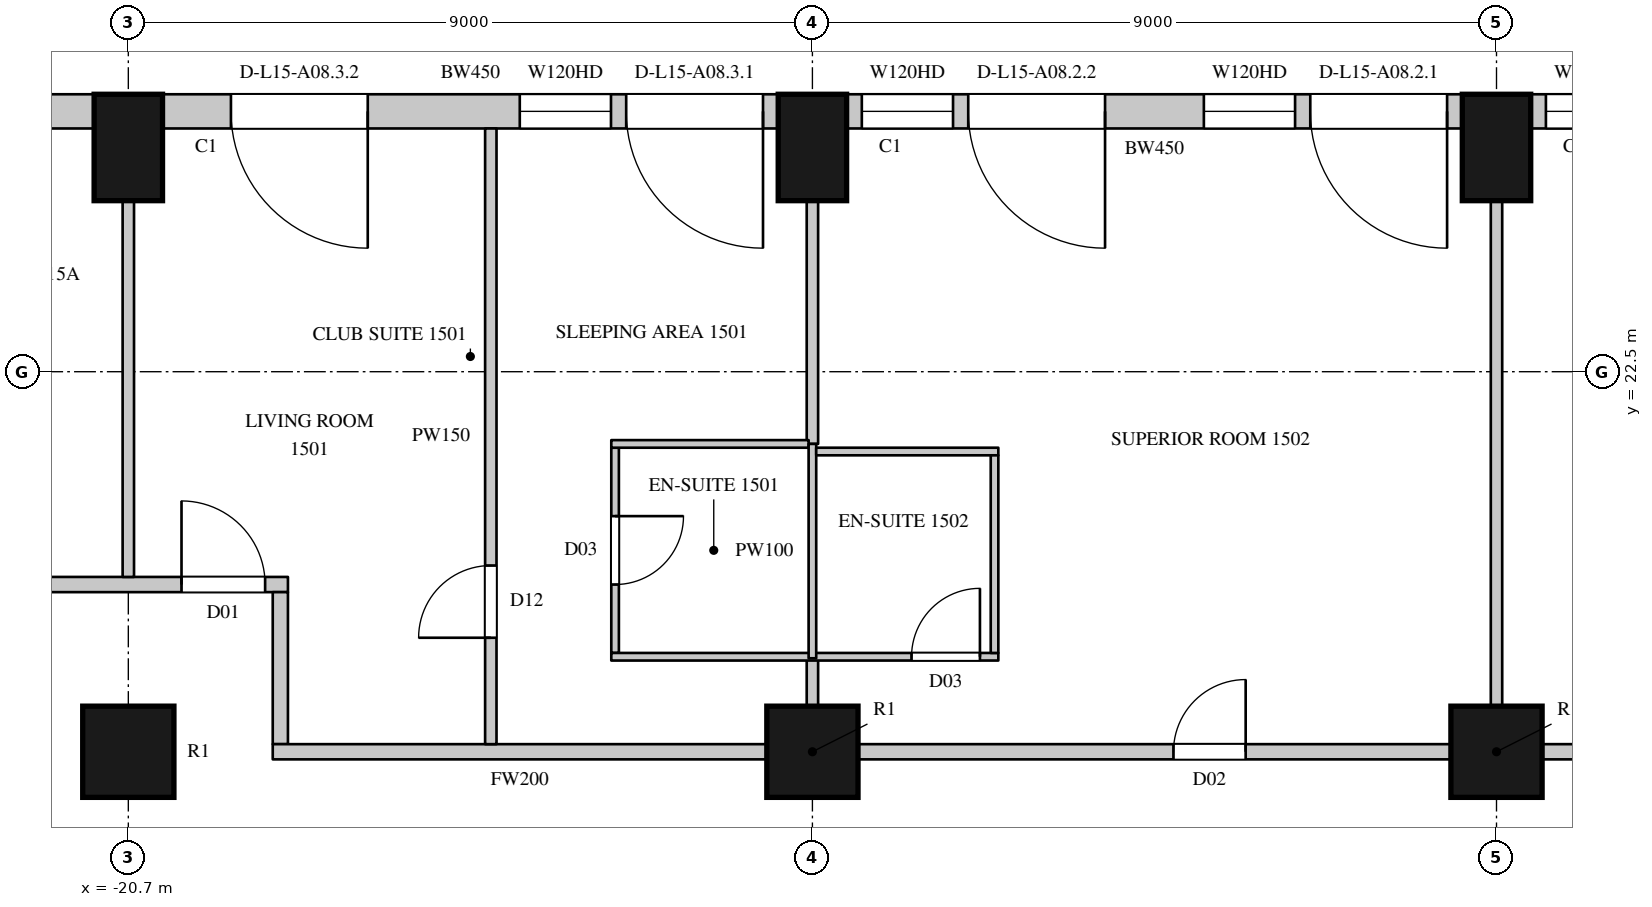
"""IFC4 building model, lengths in metres.
Left out: names, types, materials, properties, quantities, classifications, styles, units other than length and angle.
Written with IfcOpenShell. Run it as: python <this file> out.ifc"""

import sys

from ifc_helpers import new_model, si_unit, direction, frame, frame_2d, origin, origin_2d, place, context, subcontext, project, spatial, rectangle, circle, extrude, element, fill, save


model = new_model("IFC4")
c1 = context("Model", 3, precision=1e-05, world=origin(), true_north=direction((0.0, 1.0)))
c2 = subcontext(c1, "Body", "Model", "MODEL_VIEW")
j1 = project(units=[si_unit("LENGTHUNIT", "METRE"), si_unit("PLANEANGLEUNIT", "RADIAN")], contexts=[c1])
p1 = place(None, origin())
s1 = spatial("IfcSite", under=j1, at=p1, CompositionType="ELEMENT")
p2 = place(p1, origin())
s2 = spatial("IfcBuilding", under=s1, at=p2, CompositionType="ELEMENT")
p3 = place(p2, frame((0.0, 0.0, 84.3)))
s3 = spatial("IfcBuildingStorey", under=s2, at=p3, CompositionType="ELEMENT", Elevation=84.3)
for number, where, z_axis, x_axis in (
    (1, (-2.7, 25.45, 0.0), (0.0, 0.0, 1.0), (-1.0, 0.0, 0.0)),
    (2, (-11.7, 25.45, 0.0), (0.0, 0.0, 1.0), (-1.0, 0.0, 0.0)),
    (3, (-20.7, 25.45, 0.0), (0.0, 0.0, 1.0), (-1.0, 0.0, 0.0)),
):
    element("IfcColumn", number, at=place(p3, frame(where, z_axis=z_axis, x_axis=x_axis)), inside=s3, PredefinedType="COLUMN", context=c2, shape_type="SweptSolid", body=[
        extrude(rectangle(XDim=0.9, YDim=1.4, at=origin_2d()), origin(), (0.0, 0.0, 1.0), 3.6),
    ])
for number, where, z_axis, x_axis in (
    (4, (-20.7, 17.5, 0.0), (0.0, 0.0, 1.0), (1.0, 0.0, 0.0)),
    (5, (-11.7, 17.5, 0.0), (0.0, 0.0, 1.0), (1.0, 0.0, 0.0)),
    (6, (-2.7, 17.5, 0.0), (0.0, 0.0, 1.0), (1.0, 0.0, 0.0)),
):
    element("IfcColumn", number, at=place(p3, frame(where, z_axis=z_axis, x_axis=x_axis)), inside=s3, PredefinedType="COLUMN", context=c2, shape_type="SweptSolid", body=[
        extrude(circle(Radius=0.6, at=origin_2d()), origin(), (0.0, 0.0, 1.0), 3.6),
    ])
p4 = place(p3, frame((5.85, 25.925, 0.0), z_axis=(0.0, 0.0, 1.0), x_axis=(-1.0, 0.0, 0.0)))
e7 = element("IfcWall", 7, at=p4, inside=s3, PredefinedType="SOLIDWALL", context=c2, shape_type="SweptSolid", body=[
    extrude(rectangle(XDim=8.1, YDim=0.45, at=frame_2d((4.05, 0.0))), origin(), (0.0, 0.0, 1.0), 3.3),
])
p5 = place(p4, frame((0.2, 0.0, 0.0)))
e8 = element("IfcOpeningElement", 8, at=p5, cuts=e7, PredefinedType="OPENING", context=c2, shape_type="SweptSolid", body=[
    extrude(rectangle(XDim=1.8, YDim=2.4, at=frame_2d((0.9, 1.2))), frame((0.0, 0.235, 0.0), z_axis=(0.0, -1.0, 0.0), x_axis=(1.0, 0.0, 0.0)), (0.0, 0.0, 1.0), 0.47),
])
p6 = place(p4, frame((2.2, 0.0, 1.05)))
e9 = element("IfcOpeningElement", 9, at=p6, cuts=e7, PredefinedType="OPENING", context=c2, shape_type="SweptSolid", body=[
    extrude(rectangle(XDim=1.2, YDim=2.0, at=frame_2d((0.6, 1.0))), frame((0.0, 0.235, 0.0), z_axis=(0.0, -1.0, 0.0), x_axis=(1.0, 0.0, 0.0)), (0.0, 0.0, 1.0), 0.47),
])
p7 = place(p4, frame((4.7, 0.0, 0.0)))
e10 = element("IfcOpeningElement", 10, at=p7, cuts=e7, PredefinedType="OPENING", context=c2, shape_type="SweptSolid", body=[
    extrude(rectangle(XDim=1.8, YDim=2.4, at=frame_2d((0.9, 1.2))), frame((0.0, 0.235, 0.0), z_axis=(0.0, -1.0, 0.0), x_axis=(1.0, 0.0, 0.0)), (0.0, 0.0, 1.0), 0.47),
])
p8 = place(p4, frame((6.7, 0.0, 1.05)))
e11 = element("IfcOpeningElement", 11, at=p8, cuts=e7, PredefinedType="OPENING", context=c2, shape_type="SweptSolid", body=[
    extrude(rectangle(XDim=1.2, YDim=2.0, at=frame_2d((0.6, 1.0))), frame((0.0, 0.235, 0.0), z_axis=(0.0, -1.0, 0.0), x_axis=(1.0, 0.0, 0.0)), (0.0, 0.0, 1.0), 0.47),
])
p9 = place(p3, frame((-3.15, 25.925, 0.0), z_axis=(0.0, 0.0, 1.0), x_axis=(-1.0, 0.0, 0.0)))
e12 = element("IfcWall", 12, at=p9, inside=s3, PredefinedType="SOLIDWALL", context=c2, shape_type="SweptSolid", body=[
    extrude(rectangle(XDim=8.1, YDim=0.45, at=frame_2d((4.05, 0.0))), origin(), (0.0, 0.0, 1.0), 3.3),
])
p10 = place(p9, frame((0.2, 0.0, 0.0)))
e13 = element("IfcOpeningElement", 13, at=p10, cuts=e12, PredefinedType="OPENING", context=c2, shape_type="SweptSolid", body=[
    extrude(rectangle(XDim=1.8, YDim=2.4, at=frame_2d((0.9, 1.2))), frame((0.0, 0.235, 0.0), z_axis=(0.0, -1.0, 0.0), x_axis=(1.0, 0.0, 0.0)), (0.0, 0.0, 1.0), 0.47),
])
p11 = place(p9, frame((2.2, 0.0, 1.05)))
e14 = element("IfcOpeningElement", 14, at=p11, cuts=e12, PredefinedType="OPENING", context=c2, shape_type="SweptSolid", body=[
    extrude(rectangle(XDim=1.2, YDim=2.0, at=frame_2d((0.6, 1.0))), frame((0.0, 0.235, 0.0), z_axis=(0.0, -1.0, 0.0), x_axis=(1.0, 0.0, 0.0)), (0.0, 0.0, 1.0), 0.47),
])
p12 = place(p9, frame((4.7, 0.0, 0.0)))
e15 = element("IfcOpeningElement", 15, at=p12, cuts=e12, PredefinedType="OPENING", context=c2, shape_type="SweptSolid", body=[
    extrude(rectangle(XDim=1.8, YDim=2.4, at=frame_2d((0.9, 1.2))), frame((0.0, 0.235, 0.0), z_axis=(0.0, -1.0, 0.0), x_axis=(1.0, 0.0, 0.0)), (0.0, 0.0, 1.0), 0.47),
])
p13 = place(p9, frame((6.7, 0.0, 1.05)))
e16 = element("IfcOpeningElement", 16, at=p13, cuts=e12, PredefinedType="OPENING", context=c2, shape_type="SweptSolid", body=[
    extrude(rectangle(XDim=1.2, YDim=2.0, at=frame_2d((0.6, 1.0))), frame((0.0, 0.235, 0.0), z_axis=(0.0, -1.0, 0.0), x_axis=(1.0, 0.0, 0.0)), (0.0, 0.0, 1.0), 0.47),
])
p14 = place(p3, frame((-12.15, 25.925, 0.0), z_axis=(0.0, 0.0, 1.0), x_axis=(-1.0, 0.0, 0.0)))
e17 = element("IfcWall", 17, at=p14, inside=s3, PredefinedType="SOLIDWALL", context=c2, shape_type="SweptSolid", body=[
    extrude(rectangle(XDim=8.1, YDim=0.45, at=frame_2d((4.05, 0.0))), origin(), (0.0, 0.0, 1.0), 3.3),
])
p15 = place(p14, frame((0.2, 0.0, 0.0)))
e18 = element("IfcOpeningElement", 18, at=p15, cuts=e17, PredefinedType="OPENING", context=c2, shape_type="SweptSolid", body=[
    extrude(rectangle(XDim=1.8, YDim=2.4, at=frame_2d((0.9, 1.2))), frame((0.0, 0.235, 0.0), z_axis=(0.0, -1.0, 0.0), x_axis=(1.0, 0.0, 0.0)), (0.0, 0.0, 1.0), 0.47),
])
p16 = place(p14, frame((2.2, 0.0, 1.05)))
e19 = element("IfcOpeningElement", 19, at=p16, cuts=e17, PredefinedType="OPENING", context=c2, shape_type="SweptSolid", body=[
    extrude(rectangle(XDim=1.2, YDim=2.0, at=frame_2d((0.6, 1.0))), frame((0.0, 0.235, 0.0), z_axis=(0.0, -1.0, 0.0), x_axis=(1.0, 0.0, 0.0)), (0.0, 0.0, 1.0), 0.47),
])
p17 = place(p14, frame((5.4, 0.0, 0.0)))
e20 = element("IfcOpeningElement", 20, at=p17, cuts=e17, PredefinedType="OPENING", context=c2, shape_type="SweptSolid", body=[
    extrude(rectangle(XDim=1.8, YDim=2.4, at=frame_2d((0.9, 1.2))), frame((0.0, 0.235, 0.0), z_axis=(0.0, -1.0, 0.0), x_axis=(1.0, 0.0, 0.0)), (0.0, 0.0, 1.0), 0.47),
])
p18 = place(p3, frame((-21.15, 25.925, 0.0), z_axis=(0.0, 0.0, 1.0), x_axis=(-1.0, 0.0, 0.0)))
e21 = element("IfcWall", 21, at=p18, inside=s3, PredefinedType="SOLIDWALL", context=c2, shape_type="SweptSolid", body=[
    extrude(rectangle(XDim=2.914, YDim=0.45, at=frame_2d((1.457, 0.0))), origin(), (0.0, 0.0, 1.0), 3.3),
])
p19 = place(p3, frame((-23.7, 19.7, 0.0), z_axis=(0.0, 0.0, 1.0), x_axis=(1.0, 0.0, 0.0)))
e22 = element("IfcWall", 22, at=p19, inside=s3, PredefinedType="PARTITIONING", context=c2, shape_type="SweptSolid", body=[
    extrude(rectangle(XDim=5.1, YDim=0.2, at=frame_2d((2.55, 0.0))), origin(), (0.0, 0.0, 1.0), 3.3),
])
p20 = place(p19, frame((0.8, 0.0, 0.0)))
e23 = element("IfcOpeningElement", 23, at=p20, cuts=e22, PredefinedType="OPENING", context=c2, shape_type="SweptSolid", body=[
    extrude(rectangle(XDim=0.9, YDim=2.2, at=frame_2d((0.45, 1.1))), frame((0.0, 0.11, 0.0), z_axis=(0.0, -1.0, 0.0), x_axis=(1.0, 0.0, 0.0)), (0.0, 0.0, 1.0), 0.22),
])
p21 = place(p19, frame((3.7, 0.0, 0.0)))
e24 = element("IfcOpeningElement", 24, at=p21, cuts=e22, PredefinedType="OPENING", context=c2, shape_type="SweptSolid", body=[
    extrude(rectangle(XDim=1.1, YDim=2.4, at=frame_2d((0.55, 1.2))), frame((0.0, 0.11, 0.0), z_axis=(0.0, -1.0, 0.0), x_axis=(1.0, 0.0, 0.0)), (0.0, 0.0, 1.0), 0.22),
])
p22 = place(p3, frame((-18.7, 17.6, 0.0), z_axis=(0.0, 0.0, 1.0), x_axis=(0.0, 1.0, 0.0)))
e25 = element("IfcWall", 25, at=p22, inside=s3, PredefinedType="PARTITIONING", context=c2, shape_type="SweptSolid", body=[
    extrude(rectangle(XDim=2.0, YDim=0.2, at=frame_2d((1.0, 0.0))), origin(), (0.0, 0.0, 1.0), 3.3),
])
p23 = place(p3, frame((-18.8, 17.5, 0.0), z_axis=(0.0, 0.0, 1.0), x_axis=(1.0, 0.0, 0.0)))
e26 = element("IfcWall", 26, at=p23, inside=s3, PredefinedType="PARTITIONING", context=c2, shape_type="SweptSolid", body=[
    extrude(rectangle(XDim=6.5, YDim=0.2, at=frame_2d((3.25, 0.0))), origin(), (0.0, 0.0, 1.0), 2.75),
])
p24 = place(p3, frame((-11.1, 17.5, 0.0), z_axis=(0.0, 0.0, 1.0), x_axis=(1.0, 0.0, 0.0)))
e27 = element("IfcWall", 27, at=p24, inside=s3, PredefinedType="PARTITIONING", context=c2, shape_type="SweptSolid", body=[
    extrude(rectangle(XDim=7.8, YDim=0.2, at=frame_2d((3.9, 0.0))), origin(), (0.0, 0.0, 1.0), 2.75),
])
p25 = place(p24, frame((4.15, 0.0, 0.0)))
e28 = element("IfcOpeningElement", 28, at=p25, cuts=e27, PredefinedType="OPENING", context=c2, shape_type="SweptSolid", body=[
    extrude(rectangle(XDim=0.95, YDim=2.2, at=frame_2d((0.475, 1.1))), frame((0.0, 0.11, 0.0), z_axis=(0.0, -1.0, 0.0), x_axis=(1.0, 0.0, 0.0)), (0.0, 0.0, 1.0), 0.22),
])
p26 = place(p3, frame((-2.1, 17.5, 0.0), z_axis=(0.0, 0.0, 1.0), x_axis=(1.0, 0.0, 0.0)))
e29 = element("IfcWall", 29, at=p26, inside=s3, PredefinedType="PARTITIONING", context=c2, shape_type="SweptSolid", body=[
    extrude(rectangle(XDim=7.8, YDim=0.2, at=frame_2d((3.9, 0.0))), origin(), (0.0, 0.0, 1.0), 2.75),
])
p27 = place(p26, frame((1.55, 0.0, 0.0)))
e30 = element("IfcOpeningElement", 30, at=p27, cuts=e29, PredefinedType="OPENING", context=c2, shape_type="SweptSolid", body=[
    extrude(rectangle(XDim=1.1, YDim=2.4, at=frame_2d((0.55, 1.2))), frame((0.0, 0.11, 0.0), z_axis=(0.0, -1.0, 0.0), x_axis=(1.0, 0.0, 0.0)), (0.0, 0.0, 1.0), 0.22),
])
p28 = place(p3, frame((-20.7, 19.8, 0.0), z_axis=(0.0, 0.0, 1.0), x_axis=(0.0, 1.0, 0.0)))
e31 = element("IfcWall", 31, at=p28, inside=s3, PredefinedType="PARTITIONING", context=c2, shape_type="SweptSolid", body=[
    extrude(rectangle(XDim=4.95, YDim=0.15, at=frame_2d((2.475, 0.0))), origin(), (0.0, 0.0, 1.0), 2.75),
])
p29 = place(p3, frame((-15.931, 17.6, 0.0), z_axis=(0.0, 0.0, 1.0), x_axis=(0.0, 1.0, 0.0)))
e32 = element("IfcWall", 32, at=p29, inside=s3, PredefinedType="PARTITIONING", context=c2, shape_type="SweptSolid", body=[
    extrude(rectangle(XDim=8.1, YDim=0.15, at=frame_2d((4.05, 0.0))), origin(), (0.0, 0.0, 1.0), 3.3),
])
p30 = place(p29, frame((1.4, 0.0, 0.0)))
e33 = element("IfcOpeningElement", 33, at=p30, cuts=e32, PredefinedType="OPENING", context=c2, shape_type="SweptSolid", body=[
    extrude(rectangle(XDim=0.95, YDim=2.2, at=frame_2d((0.475, 1.1))), frame((0.0, 0.085, 0.0), z_axis=(0.0, -1.0, 0.0), x_axis=(1.0, 0.0, 0.0)), (0.0, 0.0, 1.0), 0.17),
])
p31 = place(p3, frame((-11.7, 18.1, 0.0), z_axis=(0.0, 0.0, 1.0), x_axis=(0.0, 1.0, 0.0)))
e34 = element("IfcWall", 34, at=p31, inside=s3, PredefinedType="PARTITIONING", context=c2, shape_type="SweptSolid", body=[
    extrude(rectangle(XDim=0.63, YDim=0.15, at=frame_2d((0.315, 0.0))), origin(), (0.0, 0.0, 1.0), 2.75),
])
p32 = place(p3, frame((-11.7, 21.55, 0.0), z_axis=(0.0, 0.0, 1.0), x_axis=(0.0, 1.0, 0.0)))
e35 = element("IfcWall", 35, at=p32, inside=s3, PredefinedType="PARTITIONING", context=c2, shape_type="SweptSolid", body=[
    extrude(rectangle(XDim=3.2, YDim=0.15, at=frame_2d((1.6, 0.0))), origin(), (0.0, 0.0, 1.0), 2.75),
])
p33 = place(p3, frame((-2.7, 18.1, 0.0), z_axis=(0.0, 0.0, 1.0), x_axis=(0.0, 1.0, 0.0)))
e36 = element("IfcWall", 36, at=p33, inside=s3, PredefinedType="PARTITIONING", context=c2, shape_type="SweptSolid", body=[
    extrude(rectangle(XDim=6.65, YDim=0.15, at=frame_2d((3.325, 0.0))), origin(), (0.0, 0.0, 1.0), 2.75),
])
p34 = place(p3, frame((-14.296, 18.8, 0.0), z_axis=(0.0, 0.0, 1.0), x_axis=(0.0, 1.0, 0.0)))
e37 = element("IfcWall", 37, at=p34, inside=s3, PredefinedType="PARTITIONING", context=c2, shape_type="SweptSolid", body=[
    extrude(rectangle(XDim=2.7, YDim=0.1, at=frame_2d((1.35, 0.0))), origin(), (0.0, 0.0, 1.0), 3.3),
])
p35 = place(p34, frame((0.9, 0.0, 0.0)))
e38 = element("IfcOpeningElement", 38, at=p35, cuts=e37, PredefinedType="OPENING", context=c2, shape_type="SweptSolid", body=[
    extrude(rectangle(XDim=0.9, YDim=2.2, at=frame_2d((0.45, 1.1))), frame((0.0, 0.06, 0.0), z_axis=(0.0, -1.0, 0.0), x_axis=(1.0, 0.0, 0.0)), (0.0, 0.0, 1.0), 0.12),
])
p36 = place(p3, frame((-14.346, 18.75, 0.0), z_axis=(0.0, 0.0, 1.0), x_axis=(1.0, 0.0, 0.0)))
e39 = element("IfcWall", 39, at=p36, inside=s3, PredefinedType="PARTITIONING", context=c2, shape_type="SweptSolid", body=[
    extrude(rectangle(XDim=5.092, YDim=0.1, at=frame_2d((2.546, 0.0))), origin(), (0.0, 0.0, 1.0), 3.3),
])
p37 = place(p36, frame((3.95, 0.0, 0.0)))
e40 = element("IfcOpeningElement", 40, at=p37, cuts=e39, PredefinedType="OPENING", context=c2, shape_type="SweptSolid", body=[
    extrude(rectangle(XDim=0.9, YDim=2.2, at=frame_2d((0.45, 1.1))), frame((0.0, 0.06, 0.0), z_axis=(0.0, -1.0, 0.0), x_axis=(1.0, 0.0, 0.0)), (0.0, 0.0, 1.0), 0.12),
])
p38 = place(p3, frame((-14.346, 21.55, 0.0), z_axis=(0.0, 0.0, 1.0), x_axis=(1.0, 0.0, 0.0)))
e41 = element("IfcWall", 41, at=p38, inside=s3, PredefinedType="PARTITIONING", context=c2, shape_type="SweptSolid", body=[
    extrude(rectangle(XDim=2.596, YDim=0.1, at=frame_2d((1.298, 0.0))), origin(), (0.0, 0.0, 1.0), 3.3),
])
p39 = place(p3, frame((-11.7, 18.73, 0.0), z_axis=(0.0, 0.0, 1.0), x_axis=(0.0, 1.0, 0.0)))
e42 = element("IfcWall", 42, at=p39, inside=s3, PredefinedType="PARTITIONING", context=c2, shape_type="SweptSolid", body=[
    extrude(rectangle(XDim=2.82, YDim=0.1, at=frame_2d((1.41, 0.0))), origin(), (0.0, 0.0, 1.0), 2.75),
])
p40 = place(p3, frame((-11.65, 21.45, 0.0), z_axis=(0.0, 0.0, 1.0), x_axis=(1.0, 0.0, 0.0)))
e43 = element("IfcWall", 43, at=p40, inside=s3, PredefinedType="PARTITIONING", context=c2, shape_type="SweptSolid", body=[
    extrude(rectangle(XDim=2.396, YDim=0.1, at=frame_2d((1.198, 0.0))), origin(), (0.0, 0.0, 1.0), 3.3),
])
p41 = place(p3, frame((-9.304, 18.8, 0.0), z_axis=(0.0, 0.0, 1.0), x_axis=(0.0, 1.0, 0.0)))
e44 = element("IfcWall", 44, at=p41, inside=s3, PredefinedType="PARTITIONING", context=c2, shape_type="SweptSolid", body=[
    extrude(rectangle(XDim=2.6, YDim=0.1, at=frame_2d((1.3, 0.0))), origin(), (0.0, 0.0, 1.0), 3.3),
])
p42 = place(p8, origin())
e45 = element("IfcWindow", 45, at=p42, inside=s3, PartitioningType="SINGLE_PANEL", PredefinedType="WINDOW", context=c2, shape_type="SweptSolid", body=[
    extrude(rectangle(XDim=1.2, YDim=2.0, at=frame_2d((0.6, 1.0))), frame((0.0, 0.135, 0.0), z_axis=(0.0, -1.0, 0.0), x_axis=(1.0, 0.0, 0.0)), (0.0, 0.0, 1.0), 0.06),
])
fill(e11, e45)
p43 = place(p10, origin())
e46 = element("IfcDoor", 46, at=p43, inside=s3, OperationType="SLIDING_TO_LEFT", PredefinedType="DOOR", context=c2, shape_type="SweptSolid", body=[
    extrude(rectangle(XDim=1.8, YDim=2.4, at=frame_2d((0.9, 1.2))), frame((0.0, 0.13, 0.0), z_axis=(0.0, -1.0, 0.0), x_axis=(1.0, 0.0, 0.0)), (0.0, 0.0, 1.0), 0.05),
])
fill(e13, e46)
p44 = place(p11, origin())
e47 = element("IfcWindow", 47, at=p44, inside=s3, PartitioningType="SINGLE_PANEL", PredefinedType="WINDOW", context=c2, shape_type="SweptSolid", body=[
    extrude(rectangle(XDim=1.2, YDim=2.0, at=frame_2d((0.6, 1.0))), frame((0.0, 0.135, 0.0), z_axis=(0.0, -1.0, 0.0), x_axis=(1.0, 0.0, 0.0)), (0.0, 0.0, 1.0), 0.06),
])
fill(e14, e47)
p45 = place(p12, origin())
e48 = element("IfcDoor", 48, at=p45, inside=s3, OperationType="SLIDING_TO_LEFT", PredefinedType="DOOR", context=c2, shape_type="SweptSolid", body=[
    extrude(rectangle(XDim=1.8, YDim=2.4, at=frame_2d((0.9, 1.2))), frame((0.0, 0.13, 0.0), z_axis=(0.0, -1.0, 0.0), x_axis=(1.0, 0.0, 0.0)), (0.0, 0.0, 1.0), 0.05),
])
fill(e15, e48)
p46 = place(p13, origin())
e49 = element("IfcWindow", 49, at=p46, inside=s3, PartitioningType="SINGLE_PANEL", PredefinedType="WINDOW", context=c2, shape_type="SweptSolid", body=[
    extrude(rectangle(XDim=1.2, YDim=2.0, at=frame_2d((0.6, 1.0))), frame((0.0, 0.135, 0.0), z_axis=(0.0, -1.0, 0.0), x_axis=(1.0, 0.0, 0.0)), (0.0, 0.0, 1.0), 0.06),
])
fill(e16, e49)
p47 = place(p15, origin())
e50 = element("IfcDoor", 50, at=p47, inside=s3, OperationType="SLIDING_TO_LEFT", PredefinedType="DOOR", context=c2, shape_type="SweptSolid", body=[
    extrude(rectangle(XDim=1.8, YDim=2.4, at=frame_2d((0.9, 1.2))), frame((0.0, 0.13, 0.0), z_axis=(0.0, -1.0, 0.0), x_axis=(1.0, 0.0, 0.0)), (0.0, 0.0, 1.0), 0.05),
])
fill(e18, e50)
p48 = place(p16, origin())
e51 = element("IfcWindow", 51, at=p48, inside=s3, PartitioningType="SINGLE_PANEL", PredefinedType="WINDOW", context=c2, shape_type="SweptSolid", body=[
    extrude(rectangle(XDim=1.2, YDim=2.0, at=frame_2d((0.6, 1.0))), frame((0.0, 0.135, 0.0), z_axis=(0.0, -1.0, 0.0), x_axis=(1.0, 0.0, 0.0)), (0.0, 0.0, 1.0), 0.06),
])
fill(e19, e51)
p49 = place(p17, origin())
e52 = element("IfcDoor", 52, at=p49, inside=s3, OperationType="SLIDING_TO_LEFT", PredefinedType="DOOR", context=c2, shape_type="SweptSolid", body=[
    extrude(rectangle(XDim=1.8, YDim=2.4, at=frame_2d((0.9, 1.2))), frame((0.0, 0.13, 0.0), z_axis=(0.0, -1.0, 0.0), x_axis=(1.0, 0.0, 0.0)), (0.0, 0.0, 1.0), 0.05),
])
fill(e20, e52)
p50 = place(p21, origin())
e53 = element("IfcDoor", 53, at=p50, inside=s3, OperationType="SINGLE_SWING_LEFT", PredefinedType="DOOR", context=c2, shape_type="SweptSolid", body=[
    extrude(rectangle(XDim=1.1, YDim=2.4, at=frame_2d((0.55, 1.2))), frame((0.0, 0.025, 0.0), z_axis=(0.0, -1.0, 0.0), x_axis=(1.0, 0.0, 0.0)), (0.0, 0.0, 1.0), 0.05),
])
fill(e24, e53)
p51 = place(p30, origin())
e54 = element("IfcDoor", 54, at=p51, inside=s3, OperationType="SINGLE_SWING_LEFT", PredefinedType="DOOR", context=c2, shape_type="SweptSolid", body=[
    extrude(rectangle(XDim=0.95, YDim=2.2, at=frame_2d((0.475, 1.1))), frame((0.0, 0.025, 0.0), z_axis=(0.0, -1.0, 0.0), x_axis=(1.0, 0.0, 0.0)), (0.0, 0.0, 1.0), 0.05),
])
fill(e33, e54)
p52 = place(p35, origin())
e55 = element("IfcDoor", 55, at=p52, inside=s3, OperationType="SINGLE_SWING_LEFT", PredefinedType="DOOR", context=c2, shape_type="SweptSolid", body=[
    extrude(rectangle(XDim=0.9, YDim=2.2, at=frame_2d((0.45, 1.1))), frame((0.0, 0.025, 0.0), z_axis=(0.0, -1.0, 0.0), x_axis=(1.0, 0.0, 0.0)), (0.0, 0.0, 1.0), 0.05),
])
fill(e38, e55)
p53 = place(p25, origin())
e56 = element("IfcDoor", 56, at=p53, inside=s3, OperationType="SINGLE_SWING_RIGHT", PredefinedType="DOOR", context=c2, shape_type="SweptSolid", body=[
    extrude(rectangle(XDim=0.95, YDim=2.2, at=frame_2d((0.475, 1.1))), frame((0.0, 0.025, 0.0), z_axis=(0.0, -1.0, 0.0), x_axis=(1.0, 0.0, 0.0)), (0.0, 0.0, 1.0), 0.05),
])
fill(e28, e56)
p54 = place(p37, origin())
e57 = element("IfcDoor", 57, at=p54, inside=s3, OperationType="SINGLE_SWING_RIGHT", PredefinedType="DOOR", context=c2, shape_type="SweptSolid", body=[
    extrude(rectangle(XDim=0.9, YDim=2.2, at=frame_2d((0.45, 1.1))), frame((0.0, 0.025, 0.0), z_axis=(0.0, -1.0, 0.0), x_axis=(1.0, 0.0, 0.0)), (0.0, 0.0, 1.0), 0.05),
])
fill(e40, e57)
save(model, sys.argv[1])
